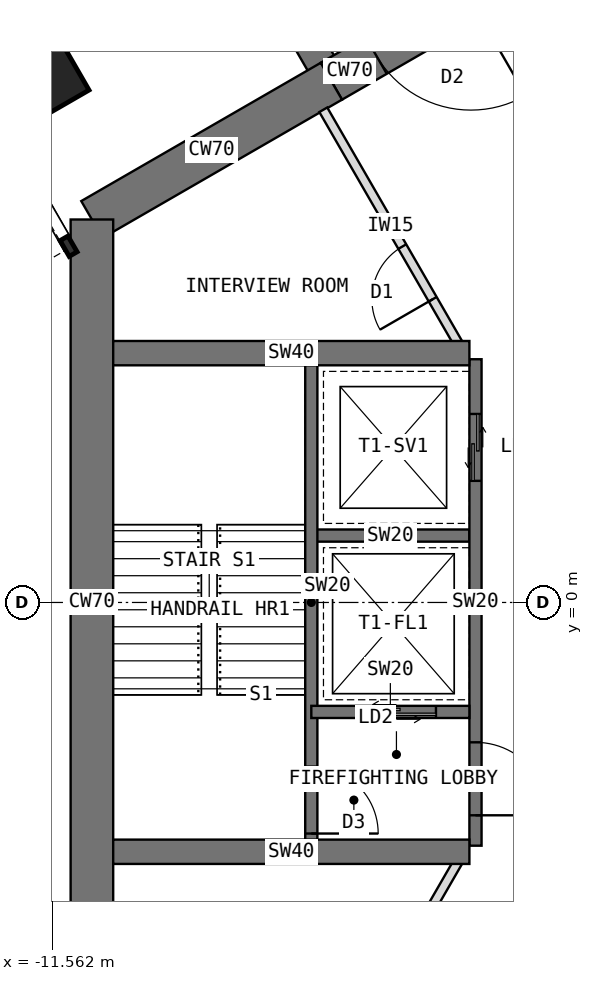
"""IFC4 building model, lengths in metres.
Left out: names, types, materials, properties, quantities, classifications, styles, units other than length and angle.
Written with IfcOpenShell. Run it as: python <this file> out.ifc"""

import sys

from ifc_helpers import new_model, si_unit, direction, frame, frame_2d, origin, origin_2d, place, context, subcontext, project, spatial, rectangle, extrude, element, fill, save


model = new_model("IFC4")
c1 = context("Model", 3, precision=1e-05, world=origin(), true_north=direction((0.0, 1.0)))
c2 = subcontext(c1, "Body", "Model", "MODEL_VIEW")
j1 = project(units=[si_unit("LENGTHUNIT", "METRE"), si_unit("PLANEANGLEUNIT", "RADIAN")], contexts=[c1])
p1 = place(None, origin())
s1 = spatial("IfcSite", under=j1, at=p1, CompositionType="ELEMENT")
p2 = place(p1, origin())
s2 = spatial("IfcBuilding", under=s1, at=p2, CompositionType="ELEMENT")
p3 = place(p2, frame((0.0, 0.0, 64.5)))
s3 = spatial("IfcBuildingStorey", under=s2, at=p3, CompositionType="ELEMENT", Elevation=64.5)
p4 = place(p3, frame((-3.939, 10.322, 0.0), z_axis=(0.0, 0.0, 1.0), x_axis=(-0.866019471182, -0.500010275428, 0.0)))
e1 = element("IfcWall", 1, at=p4, inside=s3, PredefinedType="SHEAR", context=c2, shape_type="SweptSolid", body=[
    extrude(rectangle(XDim=3.5, YDim=0.7, at=frame_2d((1.75, 0.0))), origin(), (0.0, 0.0, 1.0), 4.0),
])
p5 = place(p4, frame((0.85, 0.0, 0.0)))
e2 = element("IfcOpeningElement", 2, at=p5, cuts=e1, PredefinedType="OPENING", context=c2, shape_type="SweptSolid", body=[
    extrude(rectangle(XDim=1.8, YDim=2.1, at=frame_2d((0.9, 1.05))), frame((0.0, 0.36, 0.0), z_axis=(0.0, -1.0, 0.0), x_axis=(1.0, 0.0, 0.0)), (0.0, 0.0, 1.0), 0.72),
])
p6 = place(p3, frame((-6.97, 8.572, 0.0), z_axis=(0.0, 0.0, 1.0), x_axis=(-0.866034513004, -0.499984222037, 0.0)))
e3 = element("IfcWall", 3, at=p6, inside=s3, PredefinedType="SHEAR", context=c2, shape_type="SweptSolid", body=[
    extrude(rectangle(XDim=4.548, YDim=0.7, at=frame_2d((2.274, 0.0))), origin(), (0.0, 0.0, 1.0), 4.0),
])
p7 = place(p3, frame((-10.908, 6.298, 0.0), z_axis=(0.0, 0.0, 1.0), x_axis=(0.0, -1.0, 0.0)))
e4 = element("IfcWall", 4, at=p7, inside=s3, PredefinedType="SHEAR", context=c2, shape_type="SweptSolid", body=[
    extrude(rectangle(XDim=12.596, YDim=0.7, at=frame_2d((6.298, 0.0))), origin(), (0.0, 0.0, 1.0), 4.0),
])
p8 = place(p3, frame((-6.97, 8.572, 0.0), z_axis=(0.0, 0.0, 1.0), x_axis=(-0.499988811324, 0.866031863473, 0.0)))
e5 = element("IfcWall", 5, at=p8, inside=s3, PredefinedType="SHEAR", context=c2, shape_type="SweptSolid", body=[
    extrude(rectangle(XDim=2.592, YDim=0.5, at=frame_2d((1.296, 0.0))), origin(), (0.0, 0.0, 1.0), 4.0),
])
p9 = place(p3, frame((-11.946, 8.691, 0.0), z_axis=(0.0, 0.0, 1.0), x_axis=(0.866025403784, 0.5, 0.0)))
e6 = element("IfcColumn", 6, at=p9, inside=s3, PredefinedType="COLUMN", context=c2, shape_type="SweptSolid", body=[
    extrude(rectangle(XDim=1.45, YDim=1.45, at=origin_2d()), origin(), (0.0, 0.0, 1.0), 4.0),
])
p10 = place(p3, frame((-4.6, 4.0, 0.0), z_axis=(0.0, 0.0, 1.0), x_axis=(0.0, -1.0, 0.0)))
e7 = element("IfcWall", 7, at=p10, inside=s3, PredefinedType="SHEAR", context=c2, shape_type="SweptSolid", body=[
    extrude(rectangle(XDim=8.0, YDim=0.2, at=frame_2d((4.0, 0.0))), origin(), (0.0, 0.0, 1.0), 4.0),
])
p11 = place(p10, frame((6.3, 0.0, 0.0)))
e8 = element("IfcOpeningElement", 8, at=p11, cuts=e7, PredefinedType="OPENING", context=c2, shape_type="SweptSolid", body=[
    extrude(rectangle(XDim=1.2, YDim=2.1, at=frame_2d((0.6, 1.05))), frame((0.0, 0.11, 0.0), z_axis=(0.0, -1.0, 0.0), x_axis=(1.0, 0.0, 0.0)), (0.0, 0.0, 1.0), 0.22),
])
p12 = place(p10, frame((0.9, 0.0, 0.0)))
e9 = element("IfcOpeningElement", 9, at=p12, cuts=e7, PredefinedType="OPENING", context=c2, shape_type="SweptSolid", body=[
    extrude(rectangle(XDim=1.1, YDim=2.2, at=frame_2d((0.55, 1.1))), frame((0.0, 0.11, 0.0), z_axis=(0.0, -1.0, 0.0), x_axis=(1.0, 0.0, 0.0)), (0.0, 0.0, 1.0), 0.22),
])
p13 = place(p3, frame((-4.7, 1.1, 0.0), z_axis=(0.0, 0.0, 1.0), x_axis=(-1.0, 0.0, 0.0)))
e10 = element("IfcWall", 10, at=p13, inside=s3, PredefinedType="SHEAR", context=c2, shape_type="SweptSolid", body=[
    extrude(rectangle(XDim=2.6, YDim=0.2, at=frame_2d((1.3, 0.0))), origin(), (0.0, 0.0, 1.0), 4.0),
])
p14 = place(p3, frame((-4.7, -1.8, 0.0), z_axis=(0.0, 0.0, 1.0), x_axis=(-1.0, 0.0, 0.0)))
e11 = element("IfcWall", 11, at=p14, inside=s3, PredefinedType="SHEAR", context=c2, shape_type="SweptSolid", body=[
    extrude(rectangle(XDim=2.6, YDim=0.2, at=frame_2d((1.3, 0.0))), origin(), (0.0, 0.0, 1.0), 4.0),
])
p15 = place(p14, frame((0.55, 0.0, 0.0)))
e12 = element("IfcOpeningElement", 12, at=p15, cuts=e11, PredefinedType="OPENING", context=c2, shape_type="SweptSolid", body=[
    extrude(rectangle(XDim=1.3, YDim=2.2, at=frame_2d((0.65, 1.1))), frame((0.0, 0.11, 0.0), z_axis=(0.0, -1.0, 0.0), x_axis=(1.0, 0.0, 0.0)), (0.0, 0.0, 1.0), 0.22),
])
p16 = place(p3, frame((-7.3, 4.0, 0.0), z_axis=(0.0, 0.0, 1.0), x_axis=(0.0, -1.0, 0.0)))
e13 = element("IfcWall", 13, at=p16, inside=s3, PredefinedType="SHEAR", context=c2, shape_type="SweptSolid", body=[
    extrude(rectangle(XDim=8.0, YDim=0.2, at=frame_2d((4.0, 0.0))), origin(), (0.0, 0.0, 1.0), 4.0),
])
p17 = place(p16, frame((6.7, 0.0, 0.0)))
e14 = element("IfcOpeningElement", 14, at=p17, cuts=e13, PredefinedType="OPENING", context=c2, shape_type="SweptSolid", body=[
    extrude(rectangle(XDim=1.1, YDim=2.1, at=frame_2d((0.55, 1.05))), frame((0.0, 0.11, 0.0), z_axis=(0.0, -1.0, 0.0), x_axis=(1.0, 0.0, 0.0)), (0.0, 0.0, 1.0), 0.22),
])
for number, where, z_axis, x_axis in (
    (15, (-4.7, -4.1, 0.0), (0.0, 0.0, 1.0), (-1.0, 0.0, 0.0)),
    (16, (-4.7, 4.1, 0.0), (0.0, 0.0, 1.0), (-1.0, 0.0, 0.0)),
):
    element("IfcWall", number, at=place(p3, frame(where, z_axis=z_axis, x_axis=x_axis)), inside=s3, PredefinedType="SHEAR", context=c2, shape_type="SweptSolid", body=[
        extrude(rectangle(XDim=5.858, YDim=0.4, at=frame_2d((2.929, 0.0))), origin(), (0.0, 0.0, 1.0), 4.0),
    ])
p18 = place(p3, frame((-7.103, -8.103, 0.0), z_axis=(0.0, 0.0, 1.0), x_axis=(0.500007369519, 0.866021148949, 0.0)))
e17 = element("IfcWall", 17, at=p18, inside=s3, PredefinedType="PARTITIONING", context=c2, shape_type="SweptSolid", body=[
    extrude(rectangle(XDim=4.426, YDim=0.15, at=frame_2d((2.213, 0.0))), origin(), (0.0, 0.0, 1.0), 3.8),
])
p19 = place(p18, frame((0.828, 0.0, 0.0)))
e18 = element("IfcOpeningElement", 18, at=p19, cuts=e17, PredefinedType="OPENING", context=c2, shape_type="SweptSolid", body=[
    extrude(rectangle(XDim=1.0, YDim=2.1, at=frame_2d((0.5, 1.05))), frame((0.0, 0.085, 0.0), z_axis=(0.0, -1.0, 0.0), x_axis=(1.0, 0.0, 0.0)), (0.0, 0.0, 1.0), 0.17),
])
p20 = place(p3, frame((-4.89, 4.27, 0.0), z_axis=(0.0, 0.0, 1.0), x_axis=(-0.500007369519, 0.866021148949, 0.0)))
e19 = element("IfcWall", 19, at=p20, inside=s3, PredefinedType="PARTITIONING", context=c2, shape_type="SweptSolid", body=[
    extrude(rectangle(XDim=4.426, YDim=0.15, at=frame_2d((2.213, 0.0))), origin(), (0.0, 0.0, 1.0), 3.8),
])
p21 = place(p20, frame((0.828, 0.0, 0.0)))
e20 = element("IfcOpeningElement", 20, at=p21, cuts=e19, PredefinedType="OPENING", context=c2, shape_type="SweptSolid", body=[
    extrude(rectangle(XDim=1.0, YDim=2.1, at=frame_2d((0.5, 1.05))), frame((0.0, 0.085, 0.0), z_axis=(0.0, -1.0, 0.0), x_axis=(1.0, 0.0, 0.0)), (0.0, 0.0, 1.0), 0.17),
])
p22 = place(p11, origin())
e21 = element("IfcDoor", 21, at=p22, inside=s3, OperationType="SINGLE_SWING_RIGHT", PredefinedType="DOOR", context=c2, shape_type="SweptSolid", body=[
    extrude(rectangle(XDim=1.2, YDim=2.1, at=frame_2d((0.6, 1.05))), frame((0.0, 0.025, 0.0), z_axis=(0.0, -1.0, 0.0), x_axis=(1.0, 0.0, 0.0)), (0.0, 0.0, 1.0), 0.05),
])
fill(e8, e21)
p23 = place(p15, origin())
e22 = element("IfcDoor", 22, at=p23, inside=s3, OperationType="DOUBLE_DOOR_SLIDING", PredefinedType="DOOR", context=c2, shape_type="SweptSolid", body=[
    extrude(rectangle(XDim=1.3, YDim=2.2, at=frame_2d((0.65, 1.1))), frame((0.0, 0.025, 0.0), z_axis=(0.0, -1.0, 0.0), x_axis=(1.0, 0.0, 0.0)), (0.0, 0.0, 1.0), 0.05),
])
fill(e12, e22)
p24 = place(p12, origin())
e23 = element("IfcDoor", 23, at=p24, inside=s3, OperationType="DOUBLE_DOOR_SLIDING", PredefinedType="DOOR", context=c2, shape_type="SweptSolid", body=[
    extrude(rectangle(XDim=1.1, YDim=2.2, at=frame_2d((0.55, 1.1))), frame((0.0, 0.025, 0.0), z_axis=(0.0, -1.0, 0.0), x_axis=(1.0, 0.0, 0.0)), (0.0, 0.0, 1.0), 0.05),
])
fill(e9, e23)
p25 = place(p17, origin())
e24 = element("IfcDoor", 24, at=p25, inside=s3, OperationType="SINGLE_SWING_RIGHT", PredefinedType="DOOR", context=c2, shape_type="SweptSolid", body=[
    extrude(rectangle(XDim=1.1, YDim=2.1, at=frame_2d((0.55, 1.05))), frame((0.0, 0.025, 0.0), z_axis=(0.0, -1.0, 0.0), x_axis=(1.0, 0.0, 0.0)), (0.0, 0.0, 1.0), 0.05),
])
fill(e14, e24)
p26 = place(p5, origin())
e25 = element("IfcDoor", 25, at=p26, inside=s3, OperationType="DOUBLE_DOOR_DOUBLE_SWING", PredefinedType="DOOR", context=c2, shape_type="SweptSolid", body=[
    extrude(rectangle(XDim=1.72, YDim=2.06, at=frame_2d((0.9, 1.03))), frame((0.0, 0.025, 0.0), z_axis=(0.0, -1.0, 0.0), x_axis=(1.0, 0.0, 0.0)), (0.0, 0.0, 1.0), 0.05),
    extrude(rectangle(XDim=0.04, YDim=2.1, at=frame_2d((0.02, 1.05))), frame((0.0, 0.35, 0.0), z_axis=(0.0, -1.0, 0.0), x_axis=(1.0, 0.0, 0.0)), (0.0, 0.0, 1.0), 0.699),
    extrude(rectangle(XDim=0.04, YDim=2.1, at=frame_2d((1.78, 1.05))), frame((0.0, 0.35, 0.0), z_axis=(0.0, -1.0, 0.0), x_axis=(1.0, 0.0, 0.0)), (0.0, 0.0, 1.0), 0.699),
    extrude(rectangle(XDim=1.72, YDim=0.04, at=frame_2d((0.9, 2.08))), frame((0.0, 0.35, 0.0), z_axis=(0.0, -1.0, 0.0), x_axis=(1.0, 0.0, 0.0)), (0.0, 0.0, 1.0), 0.699),
])
fill(e2, e25)
p27 = place(p21, origin())
e26 = element("IfcDoor", 26, at=p27, inside=s3, OperationType="SINGLE_SWING_LEFT", PredefinedType="DOOR", context=c2, shape_type="SweptSolid", body=[
    extrude(rectangle(XDim=1.0, YDim=2.1, at=frame_2d((0.5, 1.05))), frame((0.0, 0.025, 0.0), z_axis=(0.0, -1.0, 0.0), x_axis=(1.0, 0.0, 0.0)), (0.0, 0.0, 1.0), 0.05),
])
fill(e20, e26)
save(model, sys.argv[1])
